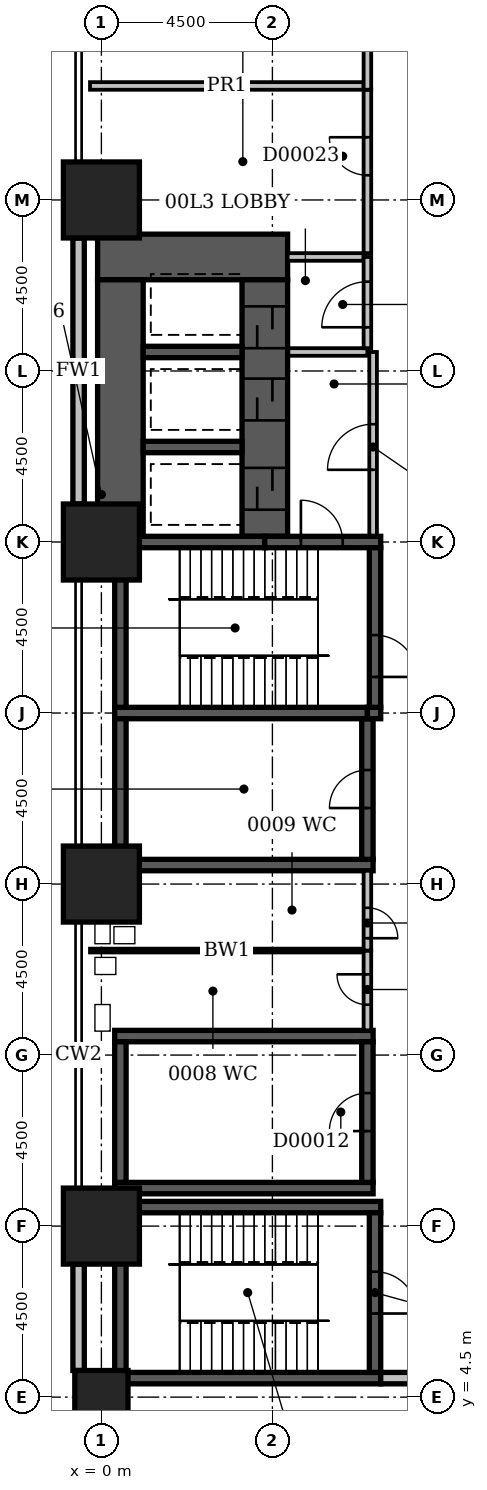
"""IFC4 building model, lengths in metres.
Left out: names, types, materials, properties, quantities, classifications, styles, units other than length and angle.
Written with IfcOpenShell. Run it as: python <this file> out.ifc"""

import sys

from ifc_helpers import new_model, si_unit, direction, frame, frame_2d, origin, origin_2d, place, context, subcontext, project, spatial, rectangle, extrude, element, fill, save


model = new_model("IFC4")
c1 = context("Model", 3, precision=1e-05, world=origin(), true_north=direction((0.0, 1.0)))
c2 = subcontext(c1, "Body", "Model", "MODEL_VIEW")
j1 = project(units=[si_unit("LENGTHUNIT", "METRE"), si_unit("PLANEANGLEUNIT", "RADIAN")], contexts=[c1])
p1 = place(None, origin())
s1 = spatial("IfcSite", under=j1, at=p1, CompositionType="ELEMENT")
p2 = place(p1, origin())
s2 = spatial("IfcBuilding", under=s1, at=p2, CompositionType="ELEMENT")
p3 = place(p2, origin())
s3 = spatial("IfcBuildingStorey", under=s2, at=p3, CompositionType="ELEMENT", Elevation=0.0)
p4 = place(p3, frame((-0.1, 34.5, -0.45), z_axis=(0.0, 0.0, 1.0), x_axis=(1.0, 0.0, 0.0)))
e1 = element("IfcWall", 1, at=p4, inside=s3, PredefinedType="SHEAR", context=c2, shape_type="SweptSolid", body=[
    extrude(rectangle(XDim=5.0, YDim=1.2, at=frame_2d((2.5, 0.0))), origin(), (0.0, 0.0, 1.0), 8.85),
])
for number, where, z_axis, x_axis in (
    (2, (0.35, 5.0, -0.45), (0.0, 0.0, 1.0), (1.0, 0.0, 0.0)),
    (3, (0.35, 9.5, -0.45), (0.0, 0.0, 1.0), (1.0, 0.0, 0.0)),
):
    element("IfcWall", number, at=place(p3, frame(where, z_axis=z_axis, x_axis=x_axis)), inside=s3, PredefinedType="SHEAR", context=c2, shape_type="SweptSolid", body=[
        extrude(rectangle(XDim=7.0, YDim=0.3, at=frame_2d((3.5, 0.0))), origin(), (0.0, 0.0, 1.0), 8.85),
    ])
for number, where, z_axis, x_axis in (
    (4, (0.35, 10.0, -0.45), (0.0, 0.0, 1.0), (1.0, 0.0, 0.0)),
    (5, (0.35, 14.0, -0.45), (0.0, 0.0, 1.0), (1.0, 0.0, 0.0)),
    (6, (0.35, 18.5, -0.45), (0.0, 0.0, 1.0), (1.0, 0.0, 0.0)),
):
    element("IfcWall", number, at=place(p3, frame(where, z_axis=z_axis, x_axis=x_axis)), inside=s3, PredefinedType="SHEAR", context=c2, shape_type="SweptSolid", body=[
        extrude(rectangle(XDim=6.8, YDim=0.3, at=frame_2d((3.4, 0.0))), origin(), (0.0, 0.0, 1.0), 8.85),
    ])
p5 = place(p3, frame((0.35, 22.5, -0.45), z_axis=(0.0, 0.0, 1.0), x_axis=(1.0, 0.0, 0.0)))
e7 = element("IfcWall", 7, at=p5, inside=s3, PredefinedType="SHEAR", context=c2, shape_type="SweptSolid", body=[
    extrude(rectangle(XDim=6.65, YDim=0.3, at=frame_2d((3.325, 0.0))), origin(), (0.0, 0.0, 1.0), 8.85),
])
p6 = place(p3, frame((0.35, 27.0, -0.45), z_axis=(0.0, 0.0, 1.0), x_axis=(1.0, 0.0, 0.0)))
e8 = element("IfcWall", 8, at=p6, inside=s3, PredefinedType="SHEAR", context=c2, shape_type="SweptSolid", body=[
    extrude(rectangle(XDim=3.95, YDim=0.3, at=frame_2d((1.975, 0.0))), origin(), (0.0, 0.0, 1.0), 8.85),
])
p7 = place(p3, frame((0.5, 5.15, -0.45), z_axis=(0.0, 0.0, 1.0), x_axis=(0.0, 1.0, 0.0)))
e9 = element("IfcWall", 9, at=p7, inside=s3, PredefinedType="SHEAR", context=c2, shape_type="SweptSolid", body=[
    extrude(rectangle(XDim=4.2, YDim=0.3, at=frame_2d((2.1, 0.0))), origin(), (0.0, 0.0, 1.0), 8.85),
])
for number, where, z_axis, x_axis in (
    (10, (0.5, 10.15, -0.45), (0.0, 0.0, 1.0), (0.0, 1.0, 0.0)),
    (11, (0.5, 18.65, -0.45), (0.0, 0.0, 1.0), (0.0, 1.0, 0.0)),
):
    element("IfcWall", number, at=place(p3, frame(where, z_axis=z_axis, x_axis=x_axis)), inside=s3, PredefinedType="SHEAR", context=c2, shape_type="SweptSolid", body=[
        extrude(rectangle(XDim=3.7, YDim=0.3, at=frame_2d((1.85, 0.0))), origin(), (0.0, 0.0, 1.0), 8.85),
    ])
p8 = place(p3, frame((0.5, 22.65, -0.45), z_axis=(0.0, 0.0, 1.0), x_axis=(0.0, 1.0, 0.0)))
e12 = element("IfcWall", 12, at=p8, inside=s3, PredefinedType="SHEAR", context=c2, shape_type="SweptSolid", body=[
    extrude(rectangle(XDim=4.2, YDim=0.3, at=frame_2d((2.1, 0.0))), origin(), (0.0, 0.0, 1.0), 8.85),
])
p9 = place(p3, frame((0.5, 27.15, -0.45), z_axis=(0.0, 0.0, 1.0), x_axis=(0.0, 1.0, 0.0)))
e13 = element("IfcWall", 13, at=p9, inside=s3, PredefinedType="SHEAR", context=c2, shape_type="SweptSolid", body=[
    extrude(rectangle(XDim=6.75, YDim=1.2, at=frame_2d((3.375, 0.0))), origin(), (0.0, 0.0, 1.0), 8.85),
])
for number, where, z_axis, x_axis in (
    (14, (1.1, 29.5, -0.45), (0.0, 0.0, 1.0), (1.0, 0.0, 0.0)),
    (15, (1.1, 32.0, -0.45), (0.0, 0.0, 1.0), (1.0, 0.0, 0.0)),
):
    element("IfcWall", number, at=place(p3, frame(where, z_axis=z_axis, x_axis=x_axis)), inside=s3, PredefinedType="SHEAR", context=c2, shape_type="SweptSolid", body=[
        extrude(rectangle(XDim=2.6, YDim=0.3, at=frame_2d((1.3, 0.0))), origin(), (0.0, 0.0, 1.0), 8.85),
    ])
p10 = place(p3, frame((4.3, 27.0, -0.45), z_axis=(0.0, 0.0, 1.0), x_axis=(1.0, 0.0, 0.0)))
e16 = element("IfcWall", 16, at=p10, inside=s3, PredefinedType="SHEAR", context=c2, shape_type="SweptSolid", body=[
    extrude(rectangle(XDim=3.05, YDim=0.3, at=frame_2d((1.525, 0.0))), origin(), (0.0, 0.0, 1.0), 8.85),
])
p11 = place(p10, frame((0.95, 0.0, 0.45)))
e17 = element("IfcOpeningElement", 17, at=p11, cuts=e16, PredefinedType="OPENING", context=c2, shape_type="SweptSolid", body=[
    extrude(rectangle(XDim=1.1, YDim=2.1, at=frame_2d((0.55, 1.05))), frame((0.0, 0.162, 0.0), z_axis=(0.0, -1.0, 0.0), x_axis=(1.0, 0.0, 0.0)), (0.0, 0.0, 1.0), 0.324),
])
p12 = place(p3, frame((4.3, 27.15, -0.45), z_axis=(0.0, 0.0, 1.0), x_axis=(0.0, 1.0, 0.0)))
e18 = element("IfcWall", 18, at=p12, inside=s3, PredefinedType="SHEAR", context=c2, shape_type="SweptSolid", body=[
    extrude(rectangle(XDim=6.75, YDim=1.2, at=frame_2d((3.375, 0.0))), origin(), (0.0, 0.0, 1.0), 8.85),
])
p13 = place(p12, frame((3.05, 0.0, 0.45)))
e19 = element("IfcOpeningElement", 19, at=p13, cuts=e18, PredefinedType="OPENING", context=c2, shape_type="SweptSolid", body=[
    extrude(rectangle(XDim=1.1, YDim=2.1, at=frame_2d((0.55, 1.05))), frame((0.0, 0.612, 0.0), z_axis=(0.0, -1.0, 0.0), x_axis=(1.0, 0.0, 0.0)), (0.0, 0.0, 1.0), 1.224),
])
p14 = place(p12, frame((0.7, 0.0, 0.45)))
e20 = element("IfcOpeningElement", 20, at=p14, cuts=e18, PredefinedType="OPENING", context=c2, shape_type="SweptSolid", body=[
    extrude(rectangle(XDim=1.1, YDim=2.1, at=frame_2d((0.55, 1.05))), frame((0.0, 0.612, 0.0), z_axis=(0.0, -1.0, 0.0), x_axis=(1.0, 0.0, 0.0)), (0.0, 0.0, 1.0), 1.224),
])
p15 = place(p12, frame((4.95, 0.0, 0.45)))
e21 = element("IfcOpeningElement", 21, at=p15, cuts=e18, PredefinedType="OPENING", context=c2, shape_type="SweptSolid", body=[
    extrude(rectangle(XDim=1.1, YDim=2.1, at=frame_2d((0.55, 1.05))), frame((0.0, 0.612, 0.0), z_axis=(0.0, -1.0, 0.0), x_axis=(1.0, 0.0, 0.0)), (0.0, 0.0, 1.0), 1.224),
])
p16 = place(p3, frame((7.0, 10.15, -0.45), z_axis=(0.0, 0.0, 1.0), x_axis=(0.0, 1.0, 0.0)))
e22 = element("IfcWall", 22, at=p16, inside=s3, PredefinedType="SHEAR", context=c2, shape_type="SweptSolid", body=[
    extrude(rectangle(XDim=3.7, YDim=0.3, at=frame_2d((1.85, 0.0))), origin(), (0.0, 0.0, 1.0), 8.85),
])
p17 = place(p16, frame((1.35, 0.0, 0.45)))
e23 = element("IfcOpeningElement", 23, at=p17, cuts=e22, PredefinedType="OPENING", context=c2, shape_type="SweptSolid", body=[
    extrude(rectangle(XDim=1.0, YDim=2.1, at=frame_2d((0.5, 1.05))), frame((0.0, 0.162, 0.0), z_axis=(0.0, -1.0, 0.0), x_axis=(1.0, 0.0, 0.0)), (0.0, 0.0, 1.0), 0.324),
])
p18 = place(p3, frame((7.0, 18.65, -0.45), z_axis=(0.0, 0.0, 1.0), x_axis=(0.0, 1.0, 0.0)))
e24 = element("IfcWall", 24, at=p18, inside=s3, PredefinedType="SHEAR", context=c2, shape_type="SweptSolid", body=[
    extrude(rectangle(XDim=3.7, YDim=0.3, at=frame_2d((1.85, 0.0))), origin(), (0.0, 0.0, 1.0), 8.85),
])
p19 = place(p18, frame((1.35, 0.0, 0.45)))
e25 = element("IfcOpeningElement", 25, at=p19, cuts=e24, PredefinedType="OPENING", context=c2, shape_type="SweptSolid", body=[
    extrude(rectangle(XDim=1.0, YDim=2.1, at=frame_2d((0.5, 1.05))), frame((0.0, 0.162, 0.0), z_axis=(0.0, -1.0, 0.0), x_axis=(1.0, 0.0, 0.0)), (0.0, 0.0, 1.0), 0.324),
])
p20 = place(p3, frame((7.0, 22.5, -0.45), z_axis=(0.0, 0.0, 1.0), x_axis=(1.0, 0.0, 0.0)))
e26 = element("IfcWall", 26, at=p20, inside=s3, PredefinedType="SHEAR", context=c2, shape_type="SweptSolid", body=[
    extrude(rectangle(XDim=0.35, YDim=0.3, at=frame_2d((0.175, 0.0))), origin(), (0.0, 0.0, 1.0), 8.85),
])
p21 = place(p3, frame((7.2, 5.15, -0.45), z_axis=(0.0, 0.0, 1.0), x_axis=(0.0, 1.0, 0.0)))
e27 = element("IfcWall", 27, at=p21, inside=s3, PredefinedType="SHEAR", context=c2, shape_type="SweptSolid", body=[
    extrude(rectangle(XDim=4.2, YDim=0.3, at=frame_2d((2.1, 0.0))), origin(), (0.0, 0.0, 1.0), 8.85),
])
p22 = place(p21, frame((1.55, 0.0, 0.45)))
e28 = element("IfcOpeningElement", 28, at=p22, cuts=e27, PredefinedType="OPENING", context=c2, shape_type="SweptSolid", body=[
    extrude(rectangle(XDim=1.1, YDim=2.1, at=frame_2d((0.55, 1.05))), frame((0.0, 0.162, 0.0), z_axis=(0.0, -1.0, 0.0), x_axis=(1.0, 0.0, 0.0)), (0.0, 0.0, 1.0), 0.324),
])
p23 = place(p3, frame((7.2, 22.65, -0.45), z_axis=(0.0, 0.0, 1.0), x_axis=(0.0, 1.0, 0.0)))
e29 = element("IfcWall", 29, at=p23, inside=s3, PredefinedType="SHEAR", context=c2, shape_type="SweptSolid", body=[
    extrude(rectangle(XDim=4.2, YDim=0.3, at=frame_2d((2.1, 0.0))), origin(), (0.0, 0.0, 1.0), 8.85),
])
p24 = place(p23, frame((0.8, 0.0, 0.45)))
e30 = element("IfcOpeningElement", 30, at=p24, cuts=e29, PredefinedType="OPENING", context=c2, shape_type="SweptSolid", body=[
    extrude(rectangle(XDim=1.1, YDim=2.1, at=frame_2d((0.55, 1.05))), frame((0.0, 0.162, 0.0), z_axis=(0.0, -1.0, 0.0), x_axis=(1.0, 0.0, 0.0)), (0.0, 0.0, 1.0), 0.324),
])
p25 = place(p3, frame((0.0, 4.5, -0.45), z_axis=(0.0, 0.0, 1.0), x_axis=(1.0, 0.0, 0.0)))
e31 = element("IfcColumn", 31, at=p25, inside=s3, PredefinedType="COLUMN", context=c2, shape_type="SweptSolid", body=[
    extrude(rectangle(XDim=1.4, YDim=1.4, at=origin_2d()), origin(), (0.0, 0.0, 1.0), 8.85),
])
for number, where, z_axis, x_axis in (
    (32, (0.0, 9.0, -0.45), (0.0, 0.0, 1.0), (1.0, 0.0, 0.0)),
    (33, (0.0, 18.0, -0.45), (0.0, 0.0, 1.0), (1.0, 0.0, 0.0)),
    (34, (0.0, 27.0, -0.45), (0.0, 0.0, 1.0), (1.0, 0.0, 0.0)),
    (35, (0.0, 36.0, -0.45), (0.0, 0.0, 1.0), (1.0, 0.0, 0.0)),
):
    element("IfcColumn", number, at=place(p3, frame(where, z_axis=z_axis, x_axis=x_axis)), inside=s3, PredefinedType="COLUMN", context=c2, shape_type="SweptSolid", body=[
        extrude(rectangle(XDim=2.0, YDim=2.0, at=origin_2d()), origin(), (0.0, 0.0, 1.0), 8.85),
    ])
p26 = place(p3, frame((-0.6, 35.0, 0.0), z_axis=(0.0, 0.0, 1.0), x_axis=(0.0, -1.0, 0.0)))
e36 = element("IfcWall", 36, at=p26, inside=s3, PredefinedType="STANDARD", context=c2, shape_type="SweptSolid", body=[
    extrude(rectangle(XDim=7.0, YDim=0.3, at=frame_2d((3.5, 0.0))), origin(), (0.0, 0.0, 1.0), 7.2),
])
p27 = place(p3, frame((-0.6, 8.0, 0.0), z_axis=(0.0, 0.0, 1.0), x_axis=(0.0, -1.0, 0.0)))
e37 = element("IfcWall", 37, at=p27, inside=s3, PredefinedType="STANDARD", context=c2, shape_type="SweptSolid", body=[
    extrude(rectangle(XDim=2.8, YDim=0.3, at=frame_2d((1.4, 0.0))), origin(), (0.0, 0.0, 1.0), 7.2),
])
p28 = place(p3, frame((4.92, 32.0, 0.0), z_axis=(0.0, 0.0, 1.0), x_axis=(1.0, 0.0, 0.0)))
e38 = element("IfcWall", 38, at=p28, inside=s3, PredefinedType="PARTITIONING", context=c2, shape_type="SweptSolid", body=[
    extrude(rectangle(XDim=2.08, YDim=0.2, at=frame_2d((1.04, 0.0))), origin(), (0.0, 0.0, 1.0), 8.4),
])
p29 = place(p3, frame((7.0, 32.1, 0.0), z_axis=(0.0, 0.0, 1.0), x_axis=(0.0, 1.0, 0.0)))
e39 = element("IfcWall", 39, at=p29, inside=s3, PredefinedType="PARTITIONING", context=c2, shape_type="SweptSolid", body=[
    extrude(rectangle(XDim=2.4, YDim=0.2, at=frame_2d((1.2, 0.0))), origin(), (0.0, 0.0, 1.0), 8.4),
])
p30 = place(p29, frame((0.55, 0.0, 0.0)))
e40 = element("IfcOpeningElement", 40, at=p30, cuts=e39, PredefinedType="OPENING", context=c2, shape_type="SweptSolid", body=[
    extrude(rectangle(XDim=1.2, YDim=2.1, at=frame_2d((0.6, 1.05))), frame((0.0, 0.112, 0.0), z_axis=(0.0, -1.0, 0.0), x_axis=(1.0, 0.0, 0.0)), (0.0, 0.0, 1.0), 0.224),
])
p31 = place(p3, frame((4.9, 34.5, 0.0), z_axis=(0.0, 0.0, 1.0), x_axis=(1.0, 0.0, 0.0)))
e41 = element("IfcWall", 41, at=p31, inside=s3, PredefinedType="PARTITIONING", context=c2, shape_type="SweptSolid", body=[
    extrude(rectangle(XDim=2.0, YDim=0.2, at=frame_2d((1.0, 0.0))), origin(), (0.0, 0.0, 1.0), 8.4),
])
p32 = place(p3, frame((7.15, 27.17, 0.0), z_axis=(0.0, 0.0, 1.0), x_axis=(0.0, 1.0, 0.0)))
e42 = element("IfcWall", 42, at=p32, inside=s3, PredefinedType="PARTITIONING", context=c2, shape_type="SweptSolid", body=[
    extrude(rectangle(XDim=4.83, YDim=0.2, at=frame_2d((2.415, 0.0))), origin(), (0.0, 0.0, 1.0), 8.4),
])
p33 = place(p32, frame((1.73, 0.0, 0.0)))
e43 = element("IfcOpeningElement", 43, at=p33, cuts=e42, PredefinedType="OPENING", context=c2, shape_type="SweptSolid", body=[
    extrude(rectangle(XDim=1.2, YDim=2.1, at=frame_2d((0.6, 1.05))), frame((0.0, 0.112, 0.0), z_axis=(0.0, -1.0, 0.0), x_axis=(1.0, 0.0, 0.0)), (0.0, 0.0, 1.0), 0.224),
])
p34 = place(p3, frame((-0.3, 16.25, 0.0), z_axis=(0.0, 0.0, 1.0), x_axis=(1.0, 0.0, 0.0)))
e44 = element("IfcWall", 44, at=p34, inside=s3, PredefinedType="PLUMBINGWALL", context=c2, shape_type="SweptSolid", body=[
    extrude(rectangle(XDim=7.2, YDim=0.1, at=frame_2d((3.6, 0.0))), origin(), (0.0, 0.0, 1.0), 8.4),
])
p35 = place(p3, frame((7.0, 16.25, 0.0), z_axis=(0.0, 0.0, 1.0), x_axis=(0.0, -1.0, 0.0)))
e45 = element("IfcWall", 45, at=p35, inside=s3, PredefinedType="PARTITIONING", context=c2, shape_type="SweptSolid", body=[
    extrude(rectangle(XDim=2.1, YDim=0.2, at=frame_2d((1.05, 0.0))), origin(), (0.0, 0.0, 1.0), 8.4),
])
p36 = place(p35, frame((0.625, 0.0, 0.0)))
e46 = element("IfcOpeningElement", 46, at=p36, cuts=e45, PredefinedType="OPENING", context=c2, shape_type="SweptSolid", body=[
    extrude(rectangle(XDim=0.8, YDim=2.1, at=frame_2d((0.4, 1.05))), frame((0.0, 0.112, 0.0), z_axis=(0.0, -1.0, 0.0), x_axis=(1.0, 0.0, 0.0)), (0.0, 0.0, 1.0), 0.224),
])
p37 = place(p3, frame((7.0, 18.35, 0.0), z_axis=(0.0, 0.0, 1.0), x_axis=(0.0, -1.0, 0.0)))
e47 = element("IfcWall", 47, at=p37, inside=s3, PredefinedType="PARTITIONING", context=c2, shape_type="SweptSolid", body=[
    extrude(rectangle(XDim=2.1, YDim=0.2, at=frame_2d((1.05, 0.0))), origin(), (0.0, 0.0, 1.0), 8.4),
])
p38 = place(p37, frame((0.975, 0.0, 0.0)))
e48 = element("IfcOpeningElement", 48, at=p38, cuts=e47, PredefinedType="OPENING", context=c2, shape_type="SweptSolid", body=[
    extrude(rectangle(XDim=0.8, YDim=2.1, at=frame_2d((0.4, 1.05))), frame((0.0, 0.112, 0.0), z_axis=(0.0, -1.0, 0.0), x_axis=(1.0, 0.0, 0.0)), (0.0, 0.0, 1.0), 0.224),
])
p39 = place(p3, frame((-0.3, 39.0, 0.0), z_axis=(0.0, 0.0, 1.0), x_axis=(1.0, 0.0, 0.0)))
e49 = element("IfcWall", 49, at=p39, inside=s3, PredefinedType="PARTITIONING", context=c2, shape_type="SweptSolid", body=[
    extrude(rectangle(XDim=7.2, YDim=0.2, at=frame_2d((3.6, 0.0))), origin(), (0.0, 0.0, 1.0), 8.4),
])
p40 = place(p3, frame((7.0, 38.9, 0.0), z_axis=(0.0, 0.0, 1.0), x_axis=(0.0, -1.0, 0.0)))
e50 = element("IfcWall", 50, at=p40, inside=s3, PredefinedType="PARTITIONING", context=c2, shape_type="SweptSolid", body=[
    extrude(rectangle(XDim=4.3, YDim=0.2, at=frame_2d((2.15, 0.0))), origin(), (0.0, 0.0, 1.0), 8.4),
])
p41 = place(p40, frame((1.25, 0.0, 0.0)))
e51 = element("IfcOpeningElement", 51, at=p41, cuts=e50, PredefinedType="OPENING", context=c2, shape_type="SweptSolid", body=[
    extrude(rectangle(XDim=1.0, YDim=2.1, at=frame_2d((0.5, 1.05))), frame((0.0, 0.112, 0.0), z_axis=(0.0, -1.0, 0.0), x_axis=(1.0, 0.0, 0.0)), (0.0, 0.0, 1.0), 0.224),
])
p42 = place(p3, frame((7.0, 43.6, 0.0), z_axis=(0.0, 0.0, 1.0), x_axis=(0.0, -1.0, 0.0)))
e52 = element("IfcWall", 52, at=p42, inside=s3, PredefinedType="PARTITIONING", context=c2, shape_type="SweptSolid", body=[
    extrude(rectangle(XDim=4.7, YDim=0.2, at=frame_2d((2.35, 0.0))), origin(), (0.0, 0.0, 1.0), 8.4),
])
p43 = place(p42, frame((1.85, 0.0, 0.0)))
e53 = element("IfcOpeningElement", 53, at=p43, cuts=e52, PredefinedType="OPENING", context=c2, shape_type="SweptSolid", body=[
    extrude(rectangle(XDim=1.0, YDim=2.1, at=frame_2d((0.5, 1.05))), frame((0.0, 0.112, 0.0), z_axis=(0.0, -1.0, 0.0), x_axis=(1.0, 0.0, 0.0)), (0.0, 0.0, 1.0), 0.224),
])
p44 = place(p3, frame((7.35, 5.0, 0.0), z_axis=(0.0, 0.0, 1.0), x_axis=(1.0, 0.0, 0.0)))
e54 = element("IfcWall", 54, at=p44, inside=s3, PredefinedType="SOLIDWALL", context=c2, shape_type="SweptSolid", body=[
    extrude(rectangle(XDim=1.65, YDim=0.3, at=frame_2d((0.825, 0.0))), origin(), (0.0, 0.0, 1.0), 8.4),
])
p45 = place(p33, origin())
e55 = element("IfcDoor", 55, at=p45, inside=s3, OperationType="SINGLE_SWING_LEFT", PredefinedType="DOOR", context=c2, shape_type="SweptSolid", body=[
    extrude(rectangle(XDim=1.2, YDim=2.1, at=frame_2d((0.6, 1.05))), frame((0.0, 0.025, 0.0), z_axis=(0.0, -1.0, 0.0), x_axis=(1.0, 0.0, 0.0)), (0.0, 0.0, 1.0), 0.05),
])
fill(e43, e55)
p46 = place(p13, origin())
e56 = element("IfcDoor", 56, at=p46, inside=s3, OperationType="SLIDING_TO_LEFT", PredefinedType="DOOR", context=c2, shape_type="SweptSolid", body=[
    extrude(rectangle(XDim=1.1, YDim=2.1, at=frame_2d((0.55, 1.05))), frame((0.0, 0.025, 0.0), z_axis=(0.0, -1.0, 0.0), x_axis=(1.0, 0.0, 0.0)), (0.0, 0.0, 1.0), 0.05),
])
fill(e19, e56)
p47 = place(p14, origin())
e57 = element("IfcDoor", 57, at=p47, inside=s3, OperationType="SLIDING_TO_LEFT", PredefinedType="DOOR", context=c2, shape_type="SweptSolid", body=[
    extrude(rectangle(XDim=1.1, YDim=2.1, at=frame_2d((0.55, 1.05))), frame((0.0, 0.025, 0.0), z_axis=(0.0, -1.0, 0.0), x_axis=(1.0, 0.0, 0.0)), (0.0, 0.0, 1.0), 0.05),
])
fill(e20, e57)
p48 = place(p30, origin())
e58 = element("IfcDoor", 58, at=p48, inside=s3, OperationType="SINGLE_SWING_LEFT", PredefinedType="DOOR", context=c2, shape_type="SweptSolid", body=[
    extrude(rectangle(XDim=1.2, YDim=2.1, at=frame_2d((0.6, 1.05))), frame((0.0, 0.025, 0.0), z_axis=(0.0, -1.0, 0.0), x_axis=(1.0, 0.0, 0.0)), (0.0, 0.0, 1.0), 0.05),
])
fill(e40, e58)
p49 = place(p15, origin())
e59 = element("IfcDoor", 59, at=p49, inside=s3, OperationType="SLIDING_TO_LEFT", PredefinedType="DOOR", context=c2, shape_type="SweptSolid", body=[
    extrude(rectangle(XDim=1.1, YDim=2.1, at=frame_2d((0.55, 1.05))), frame((0.0, 0.025, 0.0), z_axis=(0.0, -1.0, 0.0), x_axis=(1.0, 0.0, 0.0)), (0.0, 0.0, 1.0), 0.05),
])
fill(e21, e59)
p50 = place(p19, origin())
e60 = element("IfcDoor", 60, at=p50, inside=s3, OperationType="SINGLE_SWING_LEFT", PredefinedType="DOOR", context=c2, shape_type="SweptSolid", body=[
    extrude(rectangle(XDim=1.0, YDim=2.1, at=frame_2d((0.5, 1.05))), frame((0.0, 0.025, 0.0), z_axis=(0.0, -1.0, 0.0), x_axis=(1.0, 0.0, 0.0)), (0.0, 0.0, 1.0), 0.05),
])
fill(e25, e60)
p51 = place(p17, origin())
e61 = element("IfcDoor", 61, at=p51, inside=s3, OperationType="SINGLE_SWING_LEFT", PredefinedType="DOOR", context=c2, shape_type="SweptSolid", body=[
    extrude(rectangle(XDim=1.0, YDim=2.1, at=frame_2d((0.5, 1.05))), frame((0.0, 0.025, 0.0), z_axis=(0.0, -1.0, 0.0), x_axis=(1.0, 0.0, 0.0)), (0.0, 0.0, 1.0), 0.05),
])
fill(e23, e61)
p52 = place(p11, origin())
e62 = element("IfcDoor", 62, at=p52, inside=s3, OperationType="SINGLE_SWING_LEFT", PredefinedType="DOOR", context=c2, shape_type="SweptSolid", body=[
    extrude(rectangle(XDim=1.1, YDim=2.1, at=frame_2d((0.55, 1.05))), frame((0.0, 0.025, 0.0), z_axis=(0.0, -1.0, 0.0), x_axis=(1.0, 0.0, 0.0)), (0.0, 0.0, 1.0), 0.05),
])
fill(e17, e62)
p53 = place(p24, frame((1.1, 0.0, 0.0), z_axis=(0.0, 0.0, 1.0), x_axis=(-1.0, 0.0, 0.0)))
e63 = element("IfcDoor", 63, at=p53, inside=s3, OperationType="SINGLE_SWING_RIGHT", PredefinedType="DOOR", context=c2, shape_type="SweptSolid", body=[
    extrude(rectangle(XDim=1.1, YDim=2.1, at=frame_2d((0.55, 1.05))), frame((0.0, 0.025, 0.0), z_axis=(0.0, -1.0, 0.0), x_axis=(1.0, 0.0, 0.0)), (0.0, 0.0, 1.0), 0.05),
])
fill(e30, e63)
p54 = place(p22, frame((1.1, 0.0, 0.0), z_axis=(0.0, 0.0, 1.0), x_axis=(-1.0, 0.0, 0.0)))
e64 = element("IfcDoor", 64, at=p54, inside=s3, OperationType="SINGLE_SWING_RIGHT", PredefinedType="DOOR", context=c2, shape_type="SweptSolid", body=[
    extrude(rectangle(XDim=1.1, YDim=2.1, at=frame_2d((0.55, 1.05))), frame((0.0, 0.025, 0.0), z_axis=(0.0, -1.0, 0.0), x_axis=(1.0, 0.0, 0.0)), (0.0, 0.0, 1.0), 0.05),
])
fill(e28, e64)
p55 = place(p36, frame((0.8, 0.0, 0.0), z_axis=(0.0, 0.0, 1.0), x_axis=(-1.0, 0.0, 0.0)))
e65 = element("IfcDoor", 65, at=p55, inside=s3, OperationType="SINGLE_SWING_RIGHT", PredefinedType="DOOR", context=c2, shape_type="SweptSolid", body=[
    extrude(rectangle(XDim=0.8, YDim=2.1, at=frame_2d((0.4, 1.05))), frame((0.0, 0.025, 0.0), z_axis=(0.0, -1.0, 0.0), x_axis=(1.0, 0.0, 0.0)), (0.0, 0.0, 1.0), 0.05),
])
fill(e46, e65)
p56 = place(p38, frame((0.8, 0.0, 0.0), z_axis=(0.0, 0.0, 1.0), x_axis=(-1.0, 0.0, 0.0)))
e66 = element("IfcDoor", 66, at=p56, inside=s3, OperationType="SINGLE_SWING_LEFT", PredefinedType="DOOR", context=c2, shape_type="SweptSolid", body=[
    extrude(rectangle(XDim=0.8, YDim=2.1, at=frame_2d((0.4, 1.05))), frame((0.0, 0.025, 0.0), z_axis=(0.0, -1.0, 0.0), x_axis=(1.0, 0.0, 0.0)), (0.0, 0.0, 1.0), 0.05),
])
fill(e48, e66)
p57 = place(p41, frame((1.0, 0.0, 0.0), z_axis=(0.0, 0.0, 1.0), x_axis=(-1.0, 0.0, 0.0)))
e67 = element("IfcDoor", 67, at=p57, inside=s3, OperationType="SINGLE_SWING_RIGHT", PredefinedType="DOOR", context=c2, shape_type="SweptSolid", body=[
    extrude(rectangle(XDim=1.0, YDim=2.1, at=frame_2d((0.5, 1.05))), frame((0.0, 0.025, 0.0), z_axis=(0.0, -1.0, 0.0), x_axis=(1.0, 0.0, 0.0)), (0.0, 0.0, 1.0), 0.05),
])
fill(e51, e67)
save(model, sys.argv[1])
